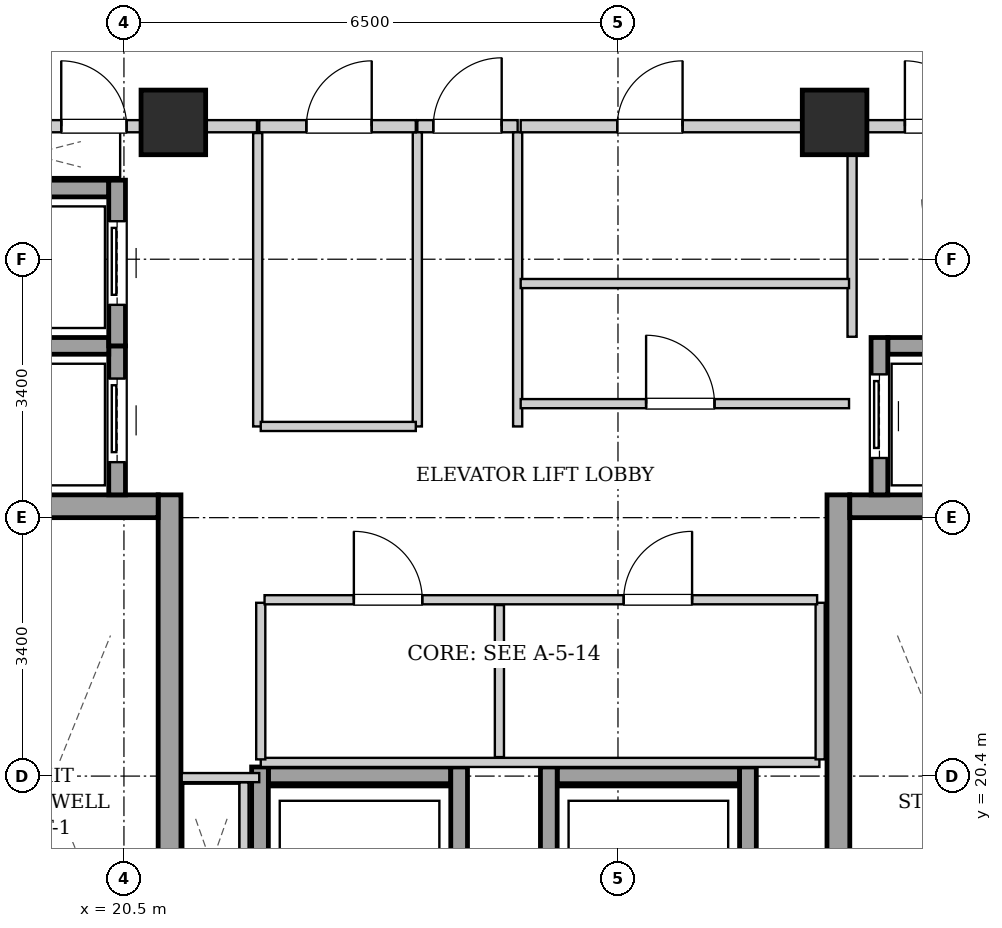
"""IFC4 building model, lengths in metres.
Left out: names, types, materials, properties, quantities, classifications, styles, units other than length and angle.
Written with IfcOpenShell. Run it as: python <this file> out.ifc"""

import sys

from ifc_helpers import new_model, si_unit, direction, frame, frame_2d, origin, origin_2d, place, context, subcontext, project, spatial, rectangle, extrude, element, fill, save


model = new_model("IFC4")
c1 = context("Model", 3, precision=1e-05, world=origin(), true_north=direction((0.0, 1.0)))
c2 = subcontext(c1, "Body", "Model", "MODEL_VIEW")
j1 = project(units=[si_unit("LENGTHUNIT", "METRE"), si_unit("PLANEANGLEUNIT", "RADIAN")], contexts=[c1])
p1 = place(None, origin())
s1 = spatial("IfcSite", under=j1, at=p1, CompositionType="ELEMENT")
p2 = place(p1, origin())
s2 = spatial("IfcBuilding", under=s1, at=p2, CompositionType="ELEMENT")
p3 = place(p2, frame((0.0, 0.0, 190.9)))
s3 = spatial("IfcBuildingStorey", under=s2, at=p3, CompositionType="ELEMENT", Elevation=190.9)
for number, where, z_axis, x_axis in (
    (1, (21.15, 29.0, 0.0), (0.0, 0.0, 1.0), (1.0, 0.0, 0.0)),
    (2, (29.85, 29.0, 0.0), (0.0, 0.0, 1.0), (1.0, 0.0, 0.0)),
):
    element("IfcColumn", number, at=place(p3, frame(where, z_axis=z_axis, x_axis=x_axis)), inside=s3, PredefinedType="COLUMN", context=c2, shape_type="SweptSolid", body=[
        extrude(rectangle(XDim=0.85, YDim=0.85, at=origin_2d()), origin(), (0.0, 0.0, 1.0), 3.3),
    ])
p4 = place(p3, frame((21.1, 15.1, 0.0), z_axis=(0.0, 0.0, 1.0), x_axis=(0.0, 1.0, 0.0)))
e3 = element("IfcWall", 3, at=p4, inside=s3, PredefinedType="SHEAR", context=c2, shape_type="SweptSolid", body=[
    extrude(rectangle(XDim=9.0, YDim=0.3, at=frame_2d((4.5, 0.0))), origin(), (0.0, 0.0, 1.0), 3.04),
])
p5 = place(p3, frame((18.1, 23.95, 0.0), z_axis=(0.0, 0.0, 1.0), x_axis=(1.0, 0.0, 0.0)))
e4 = element("IfcWall", 4, at=p5, inside=s3, PredefinedType="SHEAR", context=c2, shape_type="SweptSolid", body=[
    extrude(rectangle(XDim=2.85, YDim=0.3, at=frame_2d((1.425, 0.0))), origin(), (0.0, 0.0, 1.0), 3.04),
])
p6 = place(p3, frame((29.9, 15.1, 0.0), z_axis=(0.0, 0.0, 1.0), x_axis=(0.0, 1.0, 0.0)))
e5 = element("IfcWall", 5, at=p6, inside=s3, PredefinedType="SHEAR", context=c2, shape_type="SweptSolid", body=[
    extrude(rectangle(XDim=9.0, YDim=0.3, at=frame_2d((4.5, 0.0))), origin(), (0.0, 0.0, 1.0), 3.04),
])
p7 = place(p3, frame((30.05, 23.95, 0.0), z_axis=(0.0, 0.0, 1.0), x_axis=(1.0, 0.0, 0.0)))
e6 = element("IfcWall", 6, at=p7, inside=s3, PredefinedType="SHEAR", context=c2, shape_type="SweptSolid", body=[
    extrude(rectangle(XDim=2.85, YDim=0.3, at=frame_2d((1.425, 0.0))), origin(), (0.0, 0.0, 1.0), 3.04),
])
p8 = place(p3, frame((20.41, 24.1, 0.0), z_axis=(0.0, 0.0, 1.0), x_axis=(0.0, 1.0, 0.0)))
e7 = element("IfcWall", 7, at=p8, inside=s3, PredefinedType="SHEAR", context=c2, shape_type="SweptSolid", body=[
    extrude(rectangle(XDim=1.96, YDim=0.22, at=frame_2d((0.98, 0.0))), origin(), (0.0, 0.0, 1.0), 3.04),
])
p9 = place(p8, frame((0.43, 0.0, 0.0)))
e8 = element("IfcOpeningElement", 8, at=p9, cuts=e7, PredefinedType="OPENING", context=c2, shape_type="SweptSolid", body=[
    extrude(rectangle(XDim=1.1, YDim=2.15, at=frame_2d((0.55, 1.075))), frame((0.0, 0.12, 0.0), z_axis=(0.0, -1.0, 0.0), x_axis=(1.0, 0.0, 0.0)), (0.0, 0.0, 1.0), 0.24),
])
for number, where, z_axis, x_axis in (
    (9, (18.4, 26.06, 0.0), (0.0, 0.0, 1.0), (1.0, 0.0, 0.0)),
    (10, (18.4, 28.13, 0.0), (0.0, 0.0, 1.0), (1.0, 0.0, 0.0)),
):
    element("IfcWall", number, at=place(p3, frame(where, z_axis=z_axis, x_axis=x_axis)), inside=s3, PredefinedType="SHEAR", context=c2, shape_type="SweptSolid", body=[
        extrude(rectangle(XDim=1.9, YDim=0.22, at=frame_2d((0.95, 0.0))), origin(), (0.0, 0.0, 1.0), 3.04),
    ])
p10 = place(p3, frame((20.41, 26.06, 0.0), z_axis=(0.0, 0.0, 1.0), x_axis=(0.0, 1.0, 0.0)))
e11 = element("IfcWall", 11, at=p10, inside=s3, PredefinedType="SHEAR", context=c2, shape_type="SweptSolid", body=[
    extrude(rectangle(XDim=2.18, YDim=0.22, at=frame_2d((1.09, 0.0))), origin(), (0.0, 0.0, 1.0), 3.04),
])
p11 = place(p10, frame((0.54, 0.0, 0.0)))
e12 = element("IfcOpeningElement", 12, at=p11, cuts=e11, PredefinedType="OPENING", context=c2, shape_type="SweptSolid", body=[
    extrude(rectangle(XDim=1.1, YDim=2.15, at=frame_2d((0.55, 1.075))), frame((0.0, 0.12, 0.0), z_axis=(0.0, -1.0, 0.0), x_axis=(1.0, 0.0, 0.0)), (0.0, 0.0, 1.0), 0.24),
])
p12 = place(p3, frame((30.55, 26.06, 0.0), z_axis=(0.0, 0.0, 1.0), x_axis=(1.0, 0.0, 0.0)))
e13 = element("IfcWall", 13, at=p12, inside=s3, PredefinedType="SHEAR", context=c2, shape_type="SweptSolid", body=[
    extrude(rectangle(XDim=1.9, YDim=0.22, at=frame_2d((0.95, 0.0))), origin(), (0.0, 0.0, 1.0), 3.04),
])
p13 = place(p3, frame((30.44, 24.1, 0.0), z_axis=(0.0, 0.0, 1.0), x_axis=(0.0, 1.0, 0.0)))
e14 = element("IfcWall", 14, at=p13, inside=s3, PredefinedType="SHEAR", context=c2, shape_type="SweptSolid", body=[
    extrude(rectangle(XDim=2.07, YDim=0.22, at=frame_2d((1.035, 0.0))), origin(), (0.0, 0.0, 1.0), 3.04),
])
p14 = place(p13, frame((0.485, 0.0, 0.0)))
e15 = element("IfcOpeningElement", 15, at=p14, cuts=e14, PredefinedType="OPENING", context=c2, shape_type="SweptSolid", body=[
    extrude(rectangle(XDim=1.1, YDim=2.15, at=frame_2d((0.55, 1.075))), frame((0.0, 0.12, 0.0), z_axis=(0.0, -1.0, 0.0), x_axis=(1.0, 0.0, 0.0)), (0.0, 0.0, 1.0), 0.24),
])
p15 = place(p3, frame((22.4, 20.41, 0.0), z_axis=(0.0, 0.0, 1.0), x_axis=(1.0, 0.0, 0.0)))
e16 = element("IfcWall", 16, at=p15, inside=s3, PredefinedType="SHEAR", context=c2, shape_type="SweptSolid", body=[
    extrude(rectangle(XDim=2.4, YDim=0.22, at=frame_2d((1.2, 0.0))), origin(), (0.0, 0.0, 1.0), 3.04),
])
for number, where, z_axis, x_axis in (
    (17, (22.29, 17.98, 0.0), (0.0, 0.0, 1.0), (0.0, 1.0, 0.0)),
    (18, (24.91, 17.98, 0.0), (0.0, 0.0, 1.0), (0.0, 1.0, 0.0)),
):
    element("IfcWall", number, at=place(p3, frame(where, z_axis=z_axis, x_axis=x_axis)), inside=s3, PredefinedType="SHEAR", context=c2, shape_type="SweptSolid", body=[
        extrude(rectangle(XDim=2.54, YDim=0.22, at=frame_2d((1.27, 0.0))), origin(), (0.0, 0.0, 1.0), 3.04),
    ])
p16 = place(p3, frame((26.2, 20.41, 0.0), z_axis=(0.0, 0.0, 1.0), x_axis=(1.0, 0.0, 0.0)))
e19 = element("IfcWall", 19, at=p16, inside=s3, PredefinedType="SHEAR", context=c2, shape_type="SweptSolid", body=[
    extrude(rectangle(XDim=2.4, YDim=0.22, at=frame_2d((1.2, 0.0))), origin(), (0.0, 0.0, 1.0), 3.04),
])
for number, where, z_axis, x_axis in (
    (20, (26.09, 17.98, 0.0), (0.0, 0.0, 1.0), (0.0, 1.0, 0.0)),
    (21, (28.71, 17.98, 0.0), (0.0, 0.0, 1.0), (0.0, 1.0, 0.0)),
):
    element("IfcWall", number, at=place(p3, frame(where, z_axis=z_axis, x_axis=x_axis)), inside=s3, PredefinedType="SHEAR", context=c2, shape_type="SweptSolid", body=[
        extrude(rectangle(XDim=2.54, YDim=0.22, at=frame_2d((1.27, 0.0))), origin(), (0.0, 0.0, 1.0), 3.04),
    ])
p17 = place(p3, frame((24.36, 28.95, 0.0), z_axis=(0.0, 0.0, 1.0), x_axis=(1.0, 0.0, 0.0)))
e22 = element("IfcWall", 22, at=p17, inside=s3, PredefinedType="PARTITIONING", context=c2, shape_type="SweptSolid", body=[
    extrude(rectangle(XDim=1.32, YDim=0.16, at=frame_2d((0.66, 0.0))), origin(), (0.0, 0.0, 1.0), 2.556),
])
p18 = place(p17, frame((0.21, 0.0, 0.0)))
e23 = element("IfcOpeningElement", 23, at=p18, cuts=e22, PredefinedType="OPENING", context=c2, shape_type="SweptSolid", body=[
    extrude(rectangle(XDim=0.9, YDim=2.05, at=frame_2d((0.45, 1.025))), frame((0.0, 0.09, 0.0), z_axis=(0.0, -1.0, 0.0), x_axis=(1.0, 0.0, 0.0)), (0.0, 0.0, 1.0), 0.18),
])
p19 = place(p3, frame((17.96, 28.95, 0.0), z_axis=(0.0, 0.0, 1.0), x_axis=(1.0, 0.0, 0.0)))
e24 = element("IfcWall", 24, at=p19, inside=s3, PredefinedType="PARTITIONING", context=c2, shape_type="SweptSolid", body=[
    extrude(rectangle(XDim=4.29, YDim=0.16, at=frame_2d((2.145, 0.0))), origin(), (0.0, 0.0, 1.0), 2.556),
])
p20 = place(p19, frame((1.715, 0.0, 0.0)))
e25 = element("IfcOpeningElement", 25, at=p20, cuts=e24, PredefinedType="OPENING", context=c2, shape_type="SweptSolid", body=[
    extrude(rectangle(XDim=0.86, YDim=2.05, at=frame_2d((0.43, 1.025))), frame((0.0, 0.09, 0.0), z_axis=(0.0, -1.0, 0.0), x_axis=(1.0, 0.0, 0.0)), (0.0, 0.0, 1.0), 0.18),
])
p21 = place(p3, frame((22.08, 18.2, 0.0), z_axis=(0.0, 0.0, 1.0), x_axis=(0.0, 1.0, 0.0)))
e26 = element("IfcWall", 26, at=p21, inside=s3, PredefinedType="PARTITIONING", context=c2, shape_type="SweptSolid", body=[
    extrude(rectangle(XDim=2.12, YDim=0.12, at=frame_2d((1.06, 0.0))), origin(), (0.0, 0.0, 1.0), 3.04),
])
p22 = place(p3, frame((22.28, 20.38, 0.0), z_axis=(0.0, 0.0, 1.0), x_axis=(-1.0, 0.0, 0.0)))
e27 = element("IfcWall", 27, at=p22, inside=s3, PredefinedType="PARTITIONING", context=c2, shape_type="SweptSolid", body=[
    extrude(rectangle(XDim=1.02, YDim=0.12, at=frame_2d((0.51, 0.0))), origin(), (0.0, 0.0, 1.0), 3.04),
])
for number, where, z_axis, x_axis in (
    (28, (24.36, 25.0, 0.0), (0.0, 0.0, 1.0), (0.0, 1.0, 0.0)),
    (29, (25.68, 25.0, 0.0), (0.0, 0.0, 1.0), (0.0, 1.0, 0.0)),
):
    element("IfcWall", number, at=place(p3, frame(where, z_axis=z_axis, x_axis=x_axis)), inside=s3, PredefinedType="PARTITIONING", context=c2, shape_type="SweptSolid", body=[
        extrude(rectangle(XDim=3.87, YDim=0.12, at=frame_2d((1.935, 0.0))), origin(), (0.0, 0.0, 1.0), 3.04),
    ])
p23 = place(p3, frame((30.08, 26.18, 0.0), z_axis=(0.0, 0.0, 1.0), x_axis=(0.0, 1.0, 0.0)))
e30 = element("IfcWall", 30, at=p23, inside=s3, PredefinedType="PARTITIONING", context=c2, shape_type="SweptSolid", body=[
    extrude(rectangle(XDim=2.68, YDim=0.12, at=frame_2d((1.34, 0.0))), origin(), (0.0, 0.0, 1.0), 3.04),
])
p24 = place(p3, frame((30.08, 28.95, 0.0), z_axis=(0.0, 0.0, 1.0), x_axis=(1.0, 0.0, 0.0)))
e31 = element("IfcWall", 31, at=p24, inside=s3, PredefinedType="PARTITIONING", context=c2, shape_type="SweptSolid", body=[
    extrude(rectangle(XDim=2.96, YDim=0.16, at=frame_2d((1.48, 0.0))), origin(), (0.0, 0.0, 1.0), 3.04),
])
p25 = place(p24, frame((0.695, 0.0, 0.0)))
e32 = element("IfcOpeningElement", 32, at=p25, cuts=e31, PredefinedType="OPENING", context=c2, shape_type="SweptSolid", body=[
    extrude(rectangle(XDim=0.86, YDim=2.05, at=frame_2d((0.43, 1.025))), frame((0.0, 0.09, 0.0), z_axis=(0.0, -1.0, 0.0), x_axis=(1.0, 0.0, 0.0)), (0.0, 0.0, 1.0), 0.18),
])
p26 = place(p3, frame((22.26, 25.0, 0.0), z_axis=(0.0, 0.0, 1.0), x_axis=(0.0, 1.0, 0.0)))
e33 = element("IfcWall", 33, at=p26, inside=s3, PredefinedType="PARTITIONING", context=c2, shape_type="SweptSolid", body=[
    extrude(rectangle(XDim=3.86, YDim=0.12, at=frame_2d((1.93, 0.0))), origin(), (0.0, 0.0, 1.0), 3.04),
])
p27 = place(p3, frame((22.3, 25.0, 0.0), z_axis=(0.0, 0.0, 1.0), x_axis=(1.0, 0.0, 0.0)))
e34 = element("IfcWall", 34, at=p27, inside=s3, PredefinedType="PARTITIONING", context=c2, shape_type="SweptSolid", body=[
    extrude(rectangle(XDim=2.04, YDim=0.12, at=frame_2d((1.02, 0.0))), origin(), (0.0, 0.0, 1.0), 3.04),
])
p28 = place(p3, frame((22.28, 28.95, 0.0), z_axis=(0.0, 0.0, 1.0), x_axis=(1.0, 0.0, 0.0)))
e35 = element("IfcWall", 35, at=p28, inside=s3, PredefinedType="PARTITIONING", context=c2, shape_type="SweptSolid", body=[
    extrude(rectangle(XDim=2.06, YDim=0.16, at=frame_2d((1.03, 0.0))), origin(), (0.0, 0.0, 1.0), 2.556),
])
p29 = place(p28, frame((0.62, 0.0, 0.0)))
e36 = element("IfcOpeningElement", 36, at=p29, cuts=e35, PredefinedType="OPENING", context=c2, shape_type="SweptSolid", body=[
    extrude(rectangle(XDim=0.86, YDim=2.05, at=frame_2d((0.43, 1.025))), frame((0.0, 0.09, 0.0), z_axis=(0.0, -1.0, 0.0), x_axis=(1.0, 0.0, 0.0)), (0.0, 0.0, 1.0), 0.18),
])
p30 = place(p3, frame((25.72, 26.88, 0.0), z_axis=(0.0, 0.0, 1.0), x_axis=(1.0, 0.0, 0.0)))
e37 = element("IfcWall", 37, at=p30, inside=s3, PredefinedType="PARTITIONING", context=c2, shape_type="SweptSolid", body=[
    extrude(rectangle(XDim=4.32, YDim=0.12, at=frame_2d((2.16, 0.0))), origin(), (0.0, 0.0, 1.0), 3.04),
])
p31 = place(p3, frame((25.72, 25.3, 0.0), z_axis=(0.0, 0.0, 1.0), x_axis=(1.0, 0.0, 0.0)))
e38 = element("IfcWall", 38, at=p31, inside=s3, PredefinedType="PARTITIONING", context=c2, shape_type="SweptSolid", body=[
    extrude(rectangle(XDim=4.32, YDim=0.12, at=frame_2d((2.16, 0.0))), origin(), (0.0, 0.0, 1.0), 3.04),
])
p32 = place(p31, frame((1.65, 0.0, 0.0)))
e39 = element("IfcOpeningElement", 39, at=p32, cuts=e38, PredefinedType="OPENING", context=c2, shape_type="SweptSolid", body=[
    extrude(rectangle(XDim=0.9, YDim=2.05, at=frame_2d((0.45, 1.025))), frame((0.0, 0.07, 0.0), z_axis=(0.0, -1.0, 0.0), x_axis=(1.0, 0.0, 0.0)), (0.0, 0.0, 1.0), 0.14),
])
p33 = place(p3, frame((25.72, 28.95, 0.0), z_axis=(0.0, 0.0, 1.0), x_axis=(1.0, 0.0, 0.0)))
e40 = element("IfcWall", 40, at=p33, inside=s3, PredefinedType="PARTITIONING", context=c2, shape_type="SweptSolid", body=[
    extrude(rectangle(XDim=4.32, YDim=0.16, at=frame_2d((2.16, 0.0))), origin(), (0.0, 0.0, 1.0), 2.556),
])
p34 = place(p33, frame((1.27, 0.0, 0.0)))
e41 = element("IfcOpeningElement", 41, at=p34, cuts=e40, PredefinedType="OPENING", context=c2, shape_type="SweptSolid", body=[
    extrude(rectangle(XDim=0.86, YDim=2.05, at=frame_2d((0.43, 1.025))), frame((0.0, 0.09, 0.0), z_axis=(0.0, -1.0, 0.0), x_axis=(1.0, 0.0, 0.0)), (0.0, 0.0, 1.0), 0.18),
])
p35 = place(p3, frame((22.3, 20.58, 0.0), z_axis=(0.0, 0.0, 1.0), x_axis=(1.0, 0.0, 0.0)))
e42 = element("IfcWall", 42, at=p35, inside=s3, PredefinedType="PARTITIONING", context=c2, shape_type="SweptSolid", body=[
    extrude(rectangle(XDim=7.35, YDim=0.12, at=frame_2d((3.675, 0.0))), origin(), (0.0, 0.0, 1.0), 3.04),
])
for number, where, z_axis, x_axis in (
    (43, (22.3, 20.62, 0.0), (0.0, 0.0, 1.0), (0.0, 1.0, 0.0)),
    (44, (29.66, 20.62, 0.0), (0.0, 0.0, 1.0), (0.0, 1.0, 0.0)),
):
    element("IfcWall", number, at=place(p3, frame(where, z_axis=z_axis, x_axis=x_axis)), inside=s3, PredefinedType="PARTITIONING", context=c2, shape_type="SweptSolid", body=[
        extrude(rectangle(XDim=2.06, YDim=0.12, at=frame_2d((1.03, 0.0))), origin(), (0.0, 0.0, 1.0), 3.04),
    ])
p36 = place(p3, frame((25.44, 20.65, 0.0), z_axis=(0.0, 0.0, 1.0), x_axis=(0.0, 1.0, 0.0)))
e45 = element("IfcWall", 45, at=p36, inside=s3, PredefinedType="PARTITIONING", context=c2, shape_type="SweptSolid", body=[
    extrude(rectangle(XDim=2.0, YDim=0.12, at=frame_2d((1.0, 0.0))), origin(), (0.0, 0.0, 1.0), 3.04),
])
p37 = place(p3, frame((22.35, 22.72, 0.0), z_axis=(0.0, 0.0, 1.0), x_axis=(1.0, 0.0, 0.0)))
e46 = element("IfcWall", 46, at=p37, inside=s3, PredefinedType="PARTITIONING", context=c2, shape_type="SweptSolid", body=[
    extrude(rectangle(XDim=7.27, YDim=0.12, at=frame_2d((3.635, 0.0))), origin(), (0.0, 0.0, 1.0), 3.04),
])
p38 = place(p37, frame((1.175, 0.0, 0.0)))
e47 = element("IfcOpeningElement", 47, at=p38, cuts=e46, PredefinedType="OPENING", context=c2, shape_type="SweptSolid", body=[
    extrude(rectangle(XDim=0.9, YDim=2.05, at=frame_2d((0.45, 1.025))), frame((0.0, 0.07, 0.0), z_axis=(0.0, -1.0, 0.0), x_axis=(1.0, 0.0, 0.0)), (0.0, 0.0, 1.0), 0.14),
])
p39 = place(p37, frame((4.725, 0.0, 0.0)))
e48 = element("IfcOpeningElement", 48, at=p39, cuts=e46, PredefinedType="OPENING", context=c2, shape_type="SweptSolid", body=[
    extrude(rectangle(XDim=0.9, YDim=2.05, at=frame_2d((0.45, 1.025))), frame((0.0, 0.07, 0.0), z_axis=(0.0, -1.0, 0.0), x_axis=(1.0, 0.0, 0.0)), (0.0, 0.0, 1.0), 0.14),
])
p40 = place(p9, origin())
e49 = element("IfcDoor", 49, at=p40, inside=s3, OperationType="SLIDING_TO_LEFT", PredefinedType="DOOR", context=c2, shape_type="SweptSolid", body=[
    extrude(rectangle(XDim=1.1, YDim=2.15, at=frame_2d((0.55, 1.075))), frame((0.0, 0.025, 0.0), z_axis=(0.0, -1.0, 0.0), x_axis=(1.0, 0.0, 0.0)), (0.0, 0.0, 1.0), 0.05),
])
fill(e8, e49)
p41 = place(p11, origin())
e50 = element("IfcDoor", 50, at=p41, inside=s3, OperationType="SLIDING_TO_LEFT", PredefinedType="DOOR", context=c2, shape_type="SweptSolid", body=[
    extrude(rectangle(XDim=1.1, YDim=2.15, at=frame_2d((0.55, 1.075))), frame((0.0, 0.025, 0.0), z_axis=(0.0, -1.0, 0.0), x_axis=(1.0, 0.0, 0.0)), (0.0, 0.0, 1.0), 0.05),
])
fill(e12, e50)
p42 = place(p14, origin())
e51 = element("IfcDoor", 51, at=p42, inside=s3, OperationType="SLIDING_TO_LEFT", PredefinedType="DOOR", context=c2, shape_type="SweptSolid", body=[
    extrude(rectangle(XDim=1.1, YDim=2.15, at=frame_2d((0.55, 1.075))), frame((0.0, 0.025, 0.0), z_axis=(0.0, -1.0, 0.0), x_axis=(1.0, 0.0, 0.0)), (0.0, 0.0, 1.0), 0.05),
])
fill(e15, e51)
p43 = place(p18, origin())
e52 = element("IfcDoor", 52, at=p43, inside=s3, OperationType="SINGLE_SWING_RIGHT", PredefinedType="DOOR", context=c2, shape_type="SweptSolid", body=[
    extrude(rectangle(XDim=0.9, YDim=2.05, at=frame_2d((0.45, 1.025))), frame((0.0, 0.025, 0.0), z_axis=(0.0, -1.0, 0.0), x_axis=(1.0, 0.0, 0.0)), (0.0, 0.0, 1.0), 0.05),
])
fill(e23, e52)
p44 = place(p20, origin())
e53 = element("IfcDoor", 53, at=p44, inside=s3, OperationType="SINGLE_SWING_LEFT", PredefinedType="DOOR", context=c2, shape_type="SweptSolid", body=[
    extrude(rectangle(XDim=0.86, YDim=2.05, at=frame_2d((0.43, 1.025))), frame((0.0, 0.025, 0.0), z_axis=(0.0, -1.0, 0.0), x_axis=(1.0, 0.0, 0.0)), (0.0, 0.0, 1.0), 0.05),
])
fill(e25, e53)
p45 = place(p25, origin())
e54 = element("IfcDoor", 54, at=p45, inside=s3, OperationType="SINGLE_SWING_LEFT", PredefinedType="DOOR", context=c2, shape_type="SweptSolid", body=[
    extrude(rectangle(XDim=0.86, YDim=2.05, at=frame_2d((0.43, 1.025))), frame((0.0, 0.025, 0.0), z_axis=(0.0, -1.0, 0.0), x_axis=(1.0, 0.0, 0.0)), (0.0, 0.0, 1.0), 0.05),
])
fill(e32, e54)
p46 = place(p29, origin())
e55 = element("IfcDoor", 55, at=p46, inside=s3, OperationType="SINGLE_SWING_RIGHT", PredefinedType="DOOR", context=c2, shape_type="SweptSolid", body=[
    extrude(rectangle(XDim=0.86, YDim=2.05, at=frame_2d((0.43, 1.025))), frame((0.0, 0.025, 0.0), z_axis=(0.0, -1.0, 0.0), x_axis=(1.0, 0.0, 0.0)), (0.0, 0.0, 1.0), 0.05),
])
fill(e36, e55)
p47 = place(p32, origin())
e56 = element("IfcDoor", 56, at=p47, inside=s3, OperationType="SINGLE_SWING_LEFT", PredefinedType="DOOR", context=c2, shape_type="SweptSolid", body=[
    extrude(rectangle(XDim=0.9, YDim=2.05, at=frame_2d((0.45, 1.025))), frame((0.0, 0.025, 0.0), z_axis=(0.0, -1.0, 0.0), x_axis=(1.0, 0.0, 0.0)), (0.0, 0.0, 1.0), 0.05),
])
fill(e39, e56)
p48 = place(p34, origin())
e57 = element("IfcDoor", 57, at=p48, inside=s3, OperationType="SINGLE_SWING_RIGHT", PredefinedType="DOOR", context=c2, shape_type="SweptSolid", body=[
    extrude(rectangle(XDim=0.86, YDim=2.05, at=frame_2d((0.43, 1.025))), frame((0.0, 0.025, 0.0), z_axis=(0.0, -1.0, 0.0), x_axis=(1.0, 0.0, 0.0)), (0.0, 0.0, 1.0), 0.05),
])
fill(e41, e57)
p49 = place(p38, origin())
e58 = element("IfcDoor", 58, at=p49, inside=s3, OperationType="SINGLE_SWING_LEFT", PredefinedType="DOOR", context=c2, shape_type="SweptSolid", body=[
    extrude(rectangle(XDim=0.9, YDim=2.05, at=frame_2d((0.45, 1.025))), frame((0.0, 0.025, 0.0), z_axis=(0.0, -1.0, 0.0), x_axis=(1.0, 0.0, 0.0)), (0.0, 0.0, 1.0), 0.05),
])
fill(e47, e58)
p50 = place(p39, origin())
e59 = element("IfcDoor", 59, at=p50, inside=s3, OperationType="SINGLE_SWING_RIGHT", PredefinedType="DOOR", context=c2, shape_type="SweptSolid", body=[
    extrude(rectangle(XDim=0.9, YDim=2.05, at=frame_2d((0.45, 1.025))), frame((0.0, 0.025, 0.0), z_axis=(0.0, -1.0, 0.0), x_axis=(1.0, 0.0, 0.0)), (0.0, 0.0, 1.0), 0.05),
])
fill(e48, e59)
save(model, sys.argv[1])
